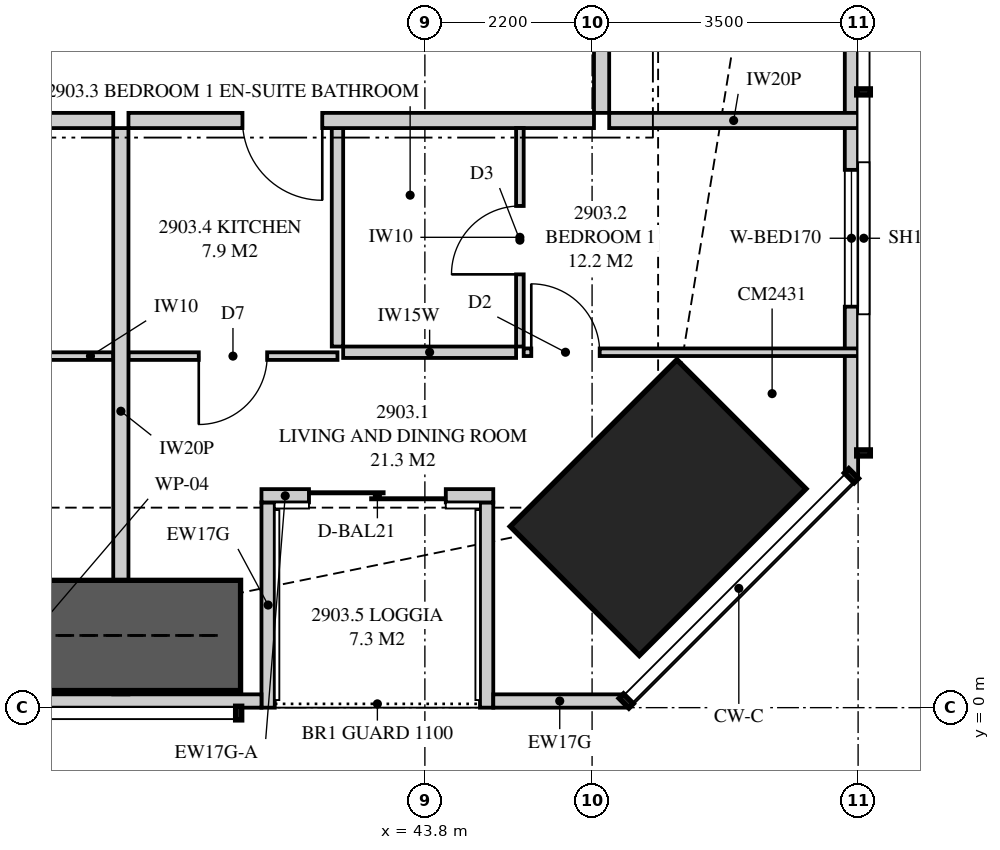
"""IFC4 building model, lengths in metres.
Left out: names, types, materials, properties, quantities, classifications, styles, units other than length and angle.
Written with IfcOpenShell. Run it as: python <this file> out.ifc"""

import sys

from ifc_helpers import new_model, si_unit, direction, frame, frame_2d, origin, origin_2d, place, context, subcontext, project, spatial, polyline, rectangle, outline, extrude, element, fill, save


model = new_model("IFC4")
c1 = context("Model", 3, precision=1e-05, world=origin(), true_north=direction((0.0, 1.0)))
c2 = subcontext(c1, "Body", "Model", "MODEL_VIEW")
j1 = project(units=[si_unit("LENGTHUNIT", "METRE"), si_unit("PLANEANGLEUNIT", "RADIAN")], contexts=[c1])
p1 = place(None, origin())
s1 = spatial("IfcSite", under=j1, at=p1, CompositionType="ELEMENT")
p2 = place(p1, origin())
s2 = spatial("IfcBuilding", under=s1, at=p2, CompositionType="ELEMENT")
p3 = place(p2, frame((0.0, 0.0, 108.2)))
s3 = spatial("IfcBuildingStorey", under=s2, at=p3, CompositionType="ELEMENT", Elevation=108.2)
p4 = place(p3, frame((46.869, 2.631, 0.0), z_axis=(0.0, 0.0, 1.0), x_axis=(-0.707106781187, 0.707106781187, 0.0)))
e1 = element("IfcColumn", 1, at=p4, inside=s3, PredefinedType="COLUMN", context=c2, shape_type="SweptSolid", body=[
    extrude(rectangle(XDim=2.4, YDim=3.1, at=origin_2d()), origin(), (0.0, 0.0, 1.0), 3.35),
])
p5 = place(p3, frame((33.9, 0.087, 0.0), z_axis=(0.0, 0.0, 1.0), x_axis=(1.0, 0.0, 0.0)))
e2 = element("IfcWall", 2, at=p5, inside=s3, PredefinedType="SOLIDWALL", context=c2, shape_type="SweptSolid", body=[
    extrude(outline(polyline([(0.0, 0.0), (7.75, 0.0), (7.75, 3.11), (4.928, 3.11), (4.928, 2.15), (4.883, 2.15), (4.883, 3.11), (4.725, 3.11), (4.725, 2.15), (0.0, 2.15), (0.0, 0.0)])), frame((0.0, 0.087, 0.0), z_axis=(0.0, -1.0, 0.0), x_axis=(1.0, 0.0, 0.0)), (0.0, 0.0, 1.0), 0.175),
])
p6 = place(p5, frame((0.64, 0.0, 0.4)))
e3 = element("IfcOpeningElement", 3, at=p6, cuts=e2, PredefinedType="OPENING", context=c2, shape_type="SweptSolid", body=[
    extrude(rectangle(XDim=1.2, YDim=1.7, at=frame_2d((0.6, 0.85))), frame((0.0, 0.097, 0.0), z_axis=(0.0, -1.0, 0.0), x_axis=(1.0, 0.0, 0.0)), (0.0, 0.0, 1.0), 0.195),
])
p7 = place(p3, frame((44.7, 0.087, 0.0), z_axis=(0.0, 0.0, 1.0), x_axis=(1.0, 0.0, 0.0)))
e4 = element("IfcWall", 4, at=p7, inside=s3, PredefinedType="SOLIDWALL", context=c2, shape_type="SweptSolid", body=[
    extrude(rectangle(XDim=1.749, YDim=0.175, at=frame_2d((0.875, 0.0))), origin(), (0.0, 0.0, 1.0), 3.11),
])
p8 = place(p3, frame((41.65, 2.788, 0.0), z_axis=(0.0, 0.0, 1.0), x_axis=(1.0, 0.0, 0.0)))
e5 = element("IfcWall", 5, at=p8, inside=s3, PredefinedType="SOLIDWALL", context=c2, shape_type="SweptSolid", body=[
    extrude(rectangle(XDim=0.625, YDim=0.175, at=frame_2d((0.312, 0.0))), origin(), (0.0, 0.0, 1.0), 2.51),
])
p9 = place(p3, frame((42.275, 2.788, 0.0), z_axis=(0.0, 0.0, 1.0), x_axis=(1.0, 0.0, 0.0)))
e6 = element("IfcWall", 6, at=p9, inside=s3, PredefinedType="SOLIDWALL", context=c2, shape_type="SweptSolid", body=[
    extrude(rectangle(XDim=2.425, YDim=0.175, at=frame_2d((1.212, 0.0))), origin(), (0.0, 0.0, 1.0), 2.15),
])
p10 = place(p9, origin())
e7 = element("IfcOpeningElement", 7, at=p10, cuts=e6, PredefinedType="OPENING", context=c2, shape_type="SweptSolid", body=[
    extrude(rectangle(XDim=1.8, YDim=2.1, at=frame_2d((0.9, 1.05))), frame((0.0, 0.097, 0.0), z_axis=(0.0, -1.0, 0.0), x_axis=(1.0, 0.0, 0.0)), (0.0, 0.0, 1.0), 0.195),
])
p11 = place(p3, frame((41.738, 0.0, 0.0), z_axis=(0.0, 0.0, 1.0), x_axis=(0.0, 1.0, 0.0)))
e8 = element("IfcWall", 8, at=p11, inside=s3, PredefinedType="SOLIDWALL", context=c2, shape_type="SweptSolid", body=[
    extrude(outline(polyline([(0.0, 0.0), (2.7, 0.0), (2.7, 2.51), (2.419, 2.51), (2.419, 2.15), (0.75, 2.15), (0.75, 3.11), (0.0, 3.11), (0.0, 0.0)])), frame((0.0, 0.087, 0.0), z_axis=(0.0, -1.0, 0.0), x_axis=(1.0, 0.0, 0.0)), (0.0, 0.0, 1.0), 0.175),
])
p12 = place(p3, frame((44.613, 0.0, 0.0), z_axis=(0.0, 0.0, 1.0), x_axis=(0.0, 1.0, 0.0)))
e9 = element("IfcWall", 9, at=p12, inside=s3, PredefinedType="SOLIDWALL", context=c2, shape_type="SweptSolid", body=[
    extrude(outline(polyline([(0.0, 0.0), (2.7, 0.0), (2.7, 2.15), (1.337, 2.15), (1.337, 3.11), (0.0, 3.11), (0.0, 0.0)])), frame((0.0, 0.087, 0.0), z_axis=(0.0, -1.0, 0.0), x_axis=(1.0, 0.0, 0.0)), (0.0, 0.0, 1.0), 0.175),
])
p13 = place(p3, frame((49.413, 3.051, 0.0), z_axis=(0.0, 0.0, 1.0), x_axis=(0.0, 1.0, 0.0)))
e10 = element("IfcWall", 10, at=p13, inside=s3, PredefinedType="SOLIDWALL", context=c2, shape_type="SweptSolid", body=[
    extrude(outline(polyline([(0.0, 0.0), (31.897, 0.0), (31.897, 3.11), (22.167, 3.11), (22.167, 2.15), (22.074, 2.15), (22.074, 3.11), (21.949, 3.11), (21.949, 2.15), (9.949, 2.15), (9.949, 3.11), (9.823, 3.11), (9.823, 2.15), (9.73, 2.15), (9.73, 3.11), (0.0, 3.11), (0.0, 0.0)])), frame((0.0, 0.087, 0.0), z_axis=(0.0, -1.0, 0.0), x_axis=(1.0, 0.0, 0.0)), (0.0, 0.0, 1.0), 0.175),
])
p14 = place(p13, frame((2.224, 0.0, 0.4)))
e11 = element("IfcOpeningElement", 11, at=p14, cuts=e10, PredefinedType="OPENING", context=c2, shape_type="SweptSolid", body=[
    extrude(rectangle(XDim=1.8, YDim=1.7, at=frame_2d((0.9, 0.85))), frame((0.0, 0.097, 0.0), z_axis=(0.0, -1.0, 0.0), x_axis=(1.0, 0.0, 0.0)), (0.0, 0.0, 1.0), 0.195),
])
p15 = place(p13, frame((14.849, 0.0, 0.4)))
e12 = element("IfcOpeningElement", 12, at=p15, cuts=e10, PredefinedType="OPENING", context=c2, shape_type="SweptSolid", body=[
    extrude(rectangle(XDim=1.2, YDim=1.7, at=frame_2d((0.6, 0.85))), frame((0.0, 0.097, 0.0), z_axis=(0.0, -1.0, 0.0), x_axis=(1.0, 0.0, 0.0)), (0.0, 0.0, 1.0), 0.195),
])
p16 = place(p13, frame((28.51, 0.0, 0.4)))
e13 = element("IfcOpeningElement", 13, at=p16, cuts=e10, PredefinedType="OPENING", context=c2, shape_type="SweptSolid", body=[
    extrude(rectangle(XDim=1.2, YDim=1.7, at=frame_2d((0.6, 0.85))), frame((0.0, 0.097, 0.0), z_axis=(0.0, -1.0, 0.0), x_axis=(1.0, 0.0, 0.0)), (0.0, 0.0, 1.0), 0.195),
])
p17 = place(p3, frame((39.8, 0.175, 0.0), z_axis=(0.0, 0.0, 1.0), x_axis=(0.0, 1.0, 0.0)))
e14 = element("IfcWall", 14, at=p17, inside=s3, PredefinedType="PARTITIONING", context=c2, shape_type="SweptSolid", body=[
    extrude(outline(polyline([(0.086, 3.11), (0.0, 3.11), (0.0, 0.0), (0.529, 0.0), (0.529, 0.701), (1.021, 0.701), (1.021, 0.0), (7.45, 0.0), (7.45, 3.11), (3.766, 3.11), (3.766, 2.51), (1.943, 2.51), (1.943, 2.15), (1.021, 2.15), (1.021, 1.449), (0.529, 1.449), (0.529, 2.15), (0.086, 2.15), (0.086, 3.11)])), frame((0.0, 0.1, 0.0), z_axis=(0.0, -1.0, 0.0), x_axis=(1.0, 0.0, 0.0)), (0.0, 0.0, 1.0), 0.2),
])
p18 = place(p3, frame((36.15, 4.625, 0.0), z_axis=(0.0, 0.0, 1.0), x_axis=(1.0, 0.0, 0.0)))
e15 = element("IfcWall", 15, at=p18, inside=s3, PredefinedType="PARTITIONING", context=c2, shape_type="SweptSolid", body=[
    extrude(outline(polyline([(0.0, 0.0), (3.55, 0.0), (3.55, 3.11), (2.762, 3.11), (2.762, 2.541), (2.188, 2.541), (2.188, 3.11), (0.0, 3.11), (0.0, 0.0)])), frame((0.0, 0.05, 0.0), z_axis=(0.0, -1.0, 0.0), x_axis=(1.0, 0.0, 0.0)), (0.0, 0.0, 1.0), 0.1),
])
p19 = place(p18, frame((1.3, 0.0, 0.0)))
e16 = element("IfcOpeningElement", 16, at=p19, cuts=e15, PredefinedType="OPENING", context=c2, shape_type="SweptSolid", body=[
    extrude(rectangle(XDim=0.9, YDim=2.1, at=frame_2d((0.45, 1.05))), frame((0.0, 0.06, 0.0), z_axis=(0.0, -1.0, 0.0), x_axis=(1.0, 0.0, 0.0)), (0.0, 0.0, 1.0), 0.12),
])
p20 = place(p3, frame((39.9, 7.725, 0.0), z_axis=(0.0, 0.0, 1.0), x_axis=(1.0, 0.0, 0.0)))
e17 = element("IfcWall", 17, at=p20, inside=s3, PredefinedType="PARTITIONING", context=c2, shape_type="SweptSolid", body=[
    extrude(rectangle(XDim=6.125, YDim=0.2, at=frame_2d((3.062, 0.0))), origin(), (0.0, 0.0, 1.0), 3.11),
])
p21 = place(p20, frame((1.5, 0.0, 0.0)))
e18 = element("IfcOpeningElement", 18, at=p21, cuts=e17, PredefinedType="OPENING", context=c2, shape_type="SweptSolid", body=[
    extrude(rectangle(XDim=1.05, YDim=2.2, at=frame_2d((0.525, 1.1))), frame((0.0, 0.11, 0.0), z_axis=(0.0, -1.0, 0.0), x_axis=(1.0, 0.0, 0.0)), (0.0, 0.0, 1.0), 0.22),
])
p22 = place(p3, frame((45.05, 4.751, 0.0), z_axis=(0.0, 0.0, 1.0), x_axis=(0.0, 1.0, 0.0)))
e19 = element("IfcWall", 19, at=p22, inside=s3, PredefinedType="PARTITIONING", context=c2, shape_type="SweptSolid", body=[
    extrude(rectangle(XDim=2.874, YDim=0.1, at=frame_2d((1.437, 0.0))), origin(), (0.0, 0.0, 1.0), 3.11),
])
p23 = place(p22, frame((0.949, 0.0, 0.0)))
e20 = element("IfcOpeningElement", 20, at=p23, cuts=e19, PredefinedType="OPENING", context=c2, shape_type="SweptSolid", body=[
    extrude(rectangle(XDim=0.9, YDim=2.1, at=frame_2d((0.45, 1.05))), frame((0.0, 0.06, 0.0), z_axis=(0.0, -1.0, 0.0), x_axis=(1.0, 0.0, 0.0)), (0.0, 0.0, 1.0), 0.12),
])
p24 = place(p3, frame((45.1, 4.676, 0.0), z_axis=(0.0, 0.0, 1.0), x_axis=(1.0, 0.0, 0.0)))
e21 = element("IfcWall", 21, at=p24, inside=s3, PredefinedType="PARTITIONING", context=c2, shape_type="SweptSolid", body=[
    extrude(outline(polyline([(0.0, 0.0), (4.4, 0.0), (4.4, 3.11), (2.971, 3.11), (2.971, 2.15), (1.229, 2.15), (1.229, 3.11), (0.0, 3.11), (0.0, 0.0)])), frame((0.0, 0.05, 0.0), z_axis=(0.0, -1.0, 0.0), x_axis=(1.0, 0.0, 0.0)), (0.0, 0.0, 1.0), 0.1),
])
p25 = place(p24, frame((0.1, 0.0, 0.0)))
e22 = element("IfcOpeningElement", 22, at=p25, cuts=e21, PredefinedType="OPENING", context=c2, shape_type="SweptSolid", body=[
    extrude(rectangle(XDim=0.9, YDim=2.1, at=frame_2d((0.45, 1.05))), frame((0.0, 0.06, 0.0), z_axis=(0.0, -1.0, 0.0), x_axis=(1.0, 0.0, 0.0)), (0.0, 0.0, 1.0), 0.12),
])
p26 = place(p3, frame((42.725, 4.676, 0.0), z_axis=(0.0, 0.0, 1.0), x_axis=(1.0, 0.0, 0.0)))
e23 = element("IfcWall", 23, at=p26, inside=s3, PredefinedType="PLUMBINGWALL", context=c2, shape_type="SweptSolid", body=[
    extrude(rectangle(XDim=2.275, YDim=0.15, at=frame_2d((1.137, 0.0))), origin(), (0.0, 0.0, 1.0), 3.11),
])
p27 = place(p3, frame((42.65, 4.751, 0.0), z_axis=(0.0, 0.0, 1.0), x_axis=(0.0, 1.0, 0.0)))
e24 = element("IfcWall", 24, at=p27, inside=s3, PredefinedType="PLUMBINGWALL", context=c2, shape_type="SweptSolid", body=[
    extrude(rectangle(XDim=2.874, YDim=0.15, at=frame_2d((1.437, 0.0))), origin(), (0.0, 0.0, 1.0), 3.11),
])
p28 = place(p3, frame((39.9, 4.625, 0.0), z_axis=(0.0, 0.0, 1.0), x_axis=(1.0, 0.0, 0.0)))
e25 = element("IfcWall", 25, at=p28, inside=s3, PredefinedType="PARTITIONING", context=c2, shape_type="SweptSolid", body=[
    extrude(rectangle(XDim=2.75, YDim=0.1, at=frame_2d((1.375, 0.0))), origin(), (0.0, 0.0, 1.0), 3.11),
])
p29 = place(p28, frame((0.925, 0.0, 0.0)))
e26 = element("IfcOpeningElement", 26, at=p29, cuts=e25, PredefinedType="OPENING", context=c2, shape_type="SweptSolid", body=[
    extrude(rectangle(XDim=0.9, YDim=2.1, at=frame_2d((0.45, 1.05))), frame((0.0, 0.06, 0.0), z_axis=(0.0, -1.0, 0.0), x_axis=(1.0, 0.0, 0.0)), (0.0, 0.0, 1.0), 0.12),
])
p30 = place(p3, frame((46.225, 7.725, 0.0), z_axis=(0.0, 0.0, 1.0), x_axis=(1.0, 0.0, 0.0)))
e27 = element("IfcWall", 27, at=p30, inside=s3, PredefinedType="PARTITIONING", context=c2, shape_type="SweptSolid", body=[
    extrude(outline(polyline([(0.0, 0.0), (3.275, 0.0), (3.275, 3.11), (2.392, 3.11), (2.392, 2.15), (0.643, 2.15), (0.643, 2.541), (0.306, 2.541), (0.306, 3.11), (0.0, 3.11), (0.0, 0.0)])), frame((0.0, 0.1, 0.0), z_axis=(0.0, -1.0, 0.0), x_axis=(1.0, 0.0, 0.0)), (0.0, 0.0, 1.0), 0.2),
])
p31 = place(p3, frame((46.125, 7.825, 0.0), z_axis=(0.0, 0.0, 1.0), x_axis=(0.0, 1.0, 0.0)))
e28 = element("IfcWall", 28, at=p31, inside=s3, PredefinedType="PARTITIONING", context=c2, shape_type="SweptSolid", body=[
    extrude(outline(polyline([(0.0, 0.0), (21.35, 0.0), (21.35, 3.11), (17.512, 3.11), (17.512, 2.541), (16.838, 2.541), (16.838, 3.11), (5.512, 3.11), (5.512, 2.541), (4.838, 2.541), (4.838, 3.11), (0.0, 3.11), (0.0, 0.0)])), frame((0.0, 0.1, 0.0), z_axis=(0.0, -1.0, 0.0), x_axis=(1.0, 0.0, 0.0)), (0.0, 0.0, 1.0), 0.2),
])
p32 = place(p31, frame((9.775, 0.0, 0.0)))
e29 = element("IfcOpeningElement", 29, at=p32, cuts=e28, PredefinedType="OPENING", context=c2, shape_type="SweptSolid", body=[
    extrude(rectangle(XDim=1.8, YDim=2.1, at=frame_2d((0.9, 1.05))), frame((0.0, 0.11, 0.0), z_axis=(0.0, -1.0, 0.0), x_axis=(1.0, 0.0, 0.0)), (0.0, 0.0, 1.0), 0.22),
])
p33 = place(p31, frame((19.5, 0.0, 0.0)))
e30 = element("IfcOpeningElement", 30, at=p33, cuts=e28, PredefinedType="OPENING", context=c2, shape_type="SweptSolid", body=[
    extrude(rectangle(XDim=1.0, YDim=2.1, at=frame_2d((0.5, 1.05))), frame((0.0, 0.11, 0.0), z_axis=(0.0, -1.0, 0.0), x_axis=(1.0, 0.0, 0.0)), (0.0, 0.0, 1.0), 0.22),
])
p34 = place(p3, frame((34.55, 7.725, 0.0), z_axis=(0.0, 0.0, 1.0), x_axis=(1.0, 0.0, 0.0)))
e31 = element("IfcWall", 31, at=p34, inside=s3, PredefinedType="PARTITIONING", context=c2, shape_type="SweptSolid", body=[
    extrude(outline(polyline([(0.0, 0.0), (5.15, 0.0), (5.15, 3.11), (4.412, 3.11), (4.412, 2.541), (3.738, 2.541), (3.738, 3.11), (0.0, 3.11), (0.0, 0.0)])), frame((0.0, 0.1, 0.0), z_axis=(0.0, -1.0, 0.0), x_axis=(1.0, 0.0, 0.0)), (0.0, 0.0, 1.0), 0.2),
])
p35 = place(p3, frame((35.875, 0.95, 0.0), z_axis=(0.0, 0.0, 1.0), x_axis=(1.0, 0.0, 0.0)))
e32 = element("IfcWall", 32, at=p35, inside=s3, PredefinedType="SHEAR", context=c2, shape_type="SweptSolid", body=[
    extrude(rectangle(XDim=5.5, YDim=1.45, at=frame_2d((2.75, 0.0))), origin(), (0.0, 0.0, 1.0), 3.35),
])
p36 = place(p10, origin())
e33 = element("IfcDoor", 33, at=p36, inside=s3, OperationType="SLIDING_TO_LEFT", PredefinedType="DOOR", context=c2, shape_type="SweptSolid", body=[
    extrude(rectangle(XDim=1.8, YDim=2.1, at=frame_2d((0.9, 1.05))), frame((0.0, 0.025, 0.0), z_axis=(0.0, -1.0, 0.0), x_axis=(1.0, 0.0, 0.0)), (0.0, 0.0, 1.0), 0.05),
])
fill(e7, e33)
p37 = place(p14, origin())
e34 = element("IfcWindow", 34, at=p37, inside=s3, PartitioningType="SINGLE_PANEL", PredefinedType="WINDOW", context=c2, shape_type="SweptSolid", body=[
    extrude(rectangle(XDim=1.8, YDim=1.7, at=frame_2d((0.9, 0.85))), frame((0.0, 0.03, 0.0), z_axis=(0.0, -1.0, 0.0), x_axis=(1.0, 0.0, 0.0)), (0.0, 0.0, 1.0), 0.06),
])
fill(e11, e34)
p38 = place(p21, frame((1.05, 0.0, 0.0), z_axis=(0.0, 0.0, 1.0), x_axis=(-1.0, 0.0, 0.0)))
e35 = element("IfcDoor", 35, at=p38, inside=s3, OperationType="SINGLE_SWING_LEFT", PredefinedType="DOOR", context=c2, shape_type="SweptSolid", body=[
    extrude(rectangle(XDim=1.05, YDim=2.2, at=frame_2d((0.525, 1.1))), frame((0.0, 0.025, 0.0), z_axis=(0.0, -1.0, 0.0), x_axis=(1.0, 0.0, 0.0)), (0.0, 0.0, 1.0), 0.05),
])
fill(e18, e35)
p39 = place(p25, origin())
e36 = element("IfcDoor", 36, at=p39, inside=s3, OperationType="SINGLE_SWING_LEFT", PredefinedType="DOOR", context=c2, shape_type="SweptSolid", body=[
    extrude(rectangle(XDim=0.9, YDim=2.1, at=frame_2d((0.45, 1.05))), frame((0.0, 0.025, 0.0), z_axis=(0.0, -1.0, 0.0), x_axis=(1.0, 0.0, 0.0)), (0.0, 0.0, 1.0), 0.05),
])
fill(e22, e36)
p40 = place(p23, origin())
e37 = element("IfcDoor", 37, at=p40, inside=s3, OperationType="SINGLE_SWING_LEFT", PredefinedType="DOOR", context=c2, shape_type="SweptSolid", body=[
    extrude(rectangle(XDim=0.9, YDim=2.1, at=frame_2d((0.45, 1.05))), frame((0.0, 0.025, 0.0), z_axis=(0.0, -1.0, 0.0), x_axis=(1.0, 0.0, 0.0)), (0.0, 0.0, 1.0), 0.05),
])
fill(e20, e37)
p41 = place(p29, frame((0.9, 0.0, 0.0), z_axis=(0.0, 0.0, 1.0), x_axis=(-1.0, 0.0, 0.0)))
e38 = element("IfcDoor", 38, at=p41, inside=s3, OperationType="SINGLE_SWING_RIGHT", PredefinedType="DOOR", context=c2, shape_type="SweptSolid", body=[
    extrude(rectangle(XDim=0.9, YDim=2.1, at=frame_2d((0.45, 1.05))), frame((0.0, 0.025, 0.0), z_axis=(0.0, -1.0, 0.0), x_axis=(1.0, 0.0, 0.0)), (0.0, 0.0, 1.0), 0.05),
])
fill(e26, e38)
save(model, sys.argv[1])
